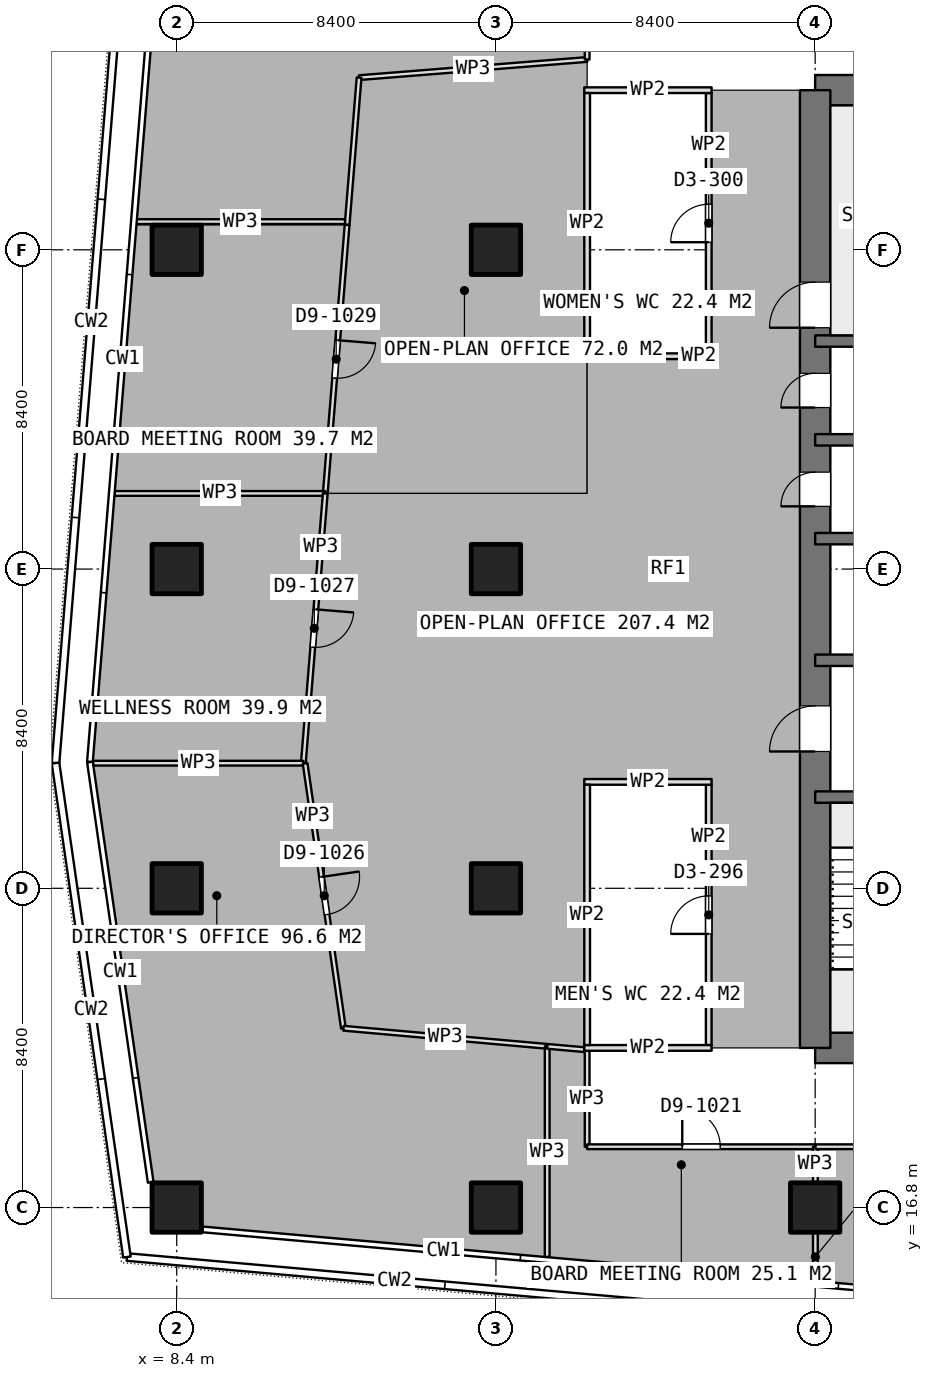
"""IFC4 building model, lengths in metres.
Left out: names, types, materials, properties, quantities, classifications, styles, units other than length and angle.
Written with IfcOpenShell. Run it as: python <this file> out.ifc"""

import sys

from ifc_helpers import new_model, si_unit, direction, frame, frame_2d, origin, origin_2d, place, context, subcontext, project, spatial, rectangle, extrude, element, fill, save


model = new_model("IFC4")
c1 = context("Model", 3, precision=1e-05, world=origin(), true_north=direction((0.0, 1.0)))
c2 = subcontext(c1, "Body", "Model", "MODEL_VIEW")
j1 = project(units=[si_unit("LENGTHUNIT", "METRE"), si_unit("PLANEANGLEUNIT", "RADIAN")], contexts=[c1])
p1 = place(None, origin())
s1 = spatial("IfcSite", under=j1, at=p1, CompositionType="ELEMENT")
p2 = place(p1, origin())
s2 = spatial("IfcBuilding", under=s1, at=p2, CompositionType="ELEMENT")
p3 = place(p2, frame((0.0, 0.0, 276.35)))
s3 = spatial("IfcBuildingStorey", under=s2, at=p3, CompositionType="ELEMENT", Elevation=276.35)
for number, where, z_axis, x_axis in (
    (1, (25.2, 21.0, 0.0), (0.0, 0.0, 1.0), (1.0, 0.0, 0.0)),
    (2, (25.2, 46.2, 0.0), (0.0, 0.0, 1.0), (1.0, 0.0, 0.0)),
):
    element("IfcWall", number, at=place(p3, frame(where, z_axis=z_axis, x_axis=x_axis)), inside=s3, PredefinedType="SHEAR", context=c2, shape_type="SweptSolid", body=[
        extrude(rectangle(XDim=10.4, YDim=0.8, at=frame_2d((5.2, 0.0))), origin(), (0.0, 0.0, 1.0), 3.75),
    ])
p4 = place(p3, frame((25.2, 21.0, 0.0), z_axis=(0.0, 0.0, 1.0), x_axis=(0.0, 1.0, 0.0)))
e3 = element("IfcWall", 3, at=p4, inside=s3, PredefinedType="SHEAR", context=c2, shape_type="SweptSolid", body=[
    extrude(rectangle(XDim=25.2, YDim=0.8, at=frame_2d((12.6, 0.0))), origin(), (0.0, 0.0, 1.0), 3.75),
])
p5 = place(p4, frame((7.8, 0.0, 0.0)))
e4 = element("IfcOpeningElement", 4, at=p5, cuts=e3, PredefinedType="OPENING", context=c2, shape_type="SweptSolid", body=[
    extrude(rectangle(XDim=1.2, YDim=2.1, at=frame_2d((0.6, 1.05))), frame((0.0, 0.41, 0.0), z_axis=(0.0, -1.0, 0.0), x_axis=(1.0, 0.0, 0.0)), (0.0, 0.0, 1.0), 0.82),
])
p6 = place(p4, frame((14.25, 0.0, 0.0)))
e5 = element("IfcOpeningElement", 5, at=p6, cuts=e3, PredefinedType="OPENING", context=c2, shape_type="SweptSolid", body=[
    extrude(rectangle(XDim=0.9, YDim=2.1, at=frame_2d((0.45, 1.05))), frame((0.0, 0.41, 0.0), z_axis=(0.0, -1.0, 0.0), x_axis=(1.0, 0.0, 0.0)), (0.0, 0.0, 1.0), 0.82),
])
p7 = place(p4, frame((16.85, 0.0, 0.0)))
e6 = element("IfcOpeningElement", 6, at=p7, cuts=e3, PredefinedType="OPENING", context=c2, shape_type="SweptSolid", body=[
    extrude(rectangle(XDim=0.9, YDim=2.1, at=frame_2d((0.45, 1.05))), frame((0.0, 0.41, 0.0), z_axis=(0.0, -1.0, 0.0), x_axis=(1.0, 0.0, 0.0)), (0.0, 0.0, 1.0), 0.82),
])
p8 = place(p4, frame((18.95, 0.0, 0.0)))
e7 = element("IfcOpeningElement", 7, at=p8, cuts=e3, PredefinedType="OPENING", context=c2, shape_type="SweptSolid", body=[
    extrude(rectangle(XDim=1.2, YDim=2.1, at=frame_2d((0.6, 1.05))), frame((0.0, 0.41, 0.0), z_axis=(0.0, -1.0, 0.0), x_axis=(1.0, 0.0, 0.0)), (0.0, 0.0, 1.0), 0.82),
])
p9 = place(p3, frame((25.2, 27.6, 0.0), z_axis=(0.0, 0.0, 1.0), x_axis=(1.0, 0.0, 0.0)))
e8 = element("IfcWall", 8, at=p9, inside=s3, PredefinedType="SHEAR", context=c2, shape_type="SweptSolid", body=[
    extrude(rectangle(XDim=6.6, YDim=0.3, at=frame_2d((3.3, 0.0))), origin(), (0.0, 0.0, 1.0), 3.75),
])
p10 = place(p9, frame((5.05, 0.0, 0.0)))
e9 = element("IfcOpeningElement", 9, at=p10, cuts=e8, PredefinedType="OPENING", context=c2, shape_type="SweptSolid", body=[
    extrude(rectangle(XDim=1.2, YDim=2.1, at=frame_2d((0.6, 1.05))), frame((0.0, 0.16, 0.0), z_axis=(0.0, -1.0, 0.0), x_axis=(1.0, 0.0, 0.0)), (0.0, 0.0, 1.0), 0.32),
])
p11 = place(p3, frame((25.2, 31.2, 0.0), z_axis=(0.0, 0.0, 1.0), x_axis=(1.0, 0.0, 0.0)))
e10 = element("IfcWall", 10, at=p11, inside=s3, PredefinedType="SHEAR", context=c2, shape_type="SweptSolid", body=[
    extrude(rectangle(XDim=6.6, YDim=0.3, at=frame_2d((3.3, 0.0))), origin(), (0.0, 0.0, 1.0), 3.75),
])
p12 = place(p11, frame((2.65, 0.0, 0.0)))
e11 = element("IfcOpeningElement", 11, at=p12, cuts=e10, PredefinedType="OPENING", context=c2, shape_type="SweptSolid", body=[
    extrude(rectangle(XDim=1.3, YDim=2.1, at=frame_2d((0.65, 1.05))), frame((0.0, 0.16, 0.0), z_axis=(0.0, -1.0, 0.0), x_axis=(1.0, 0.0, 0.0)), (0.0, 0.0, 1.0), 0.32),
])
for number, where, z_axis, x_axis in (
    (12, (25.2, 34.4, 0.0), (0.0, 0.0, 1.0), (1.0, 0.0, 0.0)),
    (13, (25.2, 37.0, 0.0), (0.0, 0.0, 1.0), (1.0, 0.0, 0.0)),
    (14, (25.2, 39.6, 0.0), (0.0, 0.0, 1.0), (1.0, 0.0, 0.0)),
):
    element("IfcWall", number, at=place(p3, frame(where, z_axis=z_axis, x_axis=x_axis)), inside=s3, PredefinedType="SHEAR", context=c2, shape_type="SweptSolid", body=[
        extrude(rectangle(XDim=6.6, YDim=0.3, at=frame_2d((3.3, 0.0))), origin(), (0.0, 0.0, 1.0), 3.75),
    ])
for number, where, z_axis, x_axis in (
    (15, (8.4, 16.8, 0.0), (0.0, 0.0, 1.0), (1.0, 0.0, 0.0)),
    (16, (8.4, 25.2, 0.0), (0.0, 0.0, 1.0), (1.0, 0.0, 0.0)),
    (17, (8.4, 33.6, 0.0), (0.0, 0.0, 1.0), (1.0, 0.0, 0.0)),
    (18, (8.4, 42.0, 0.0), (0.0, 0.0, 1.0), (1.0, 0.0, 0.0)),
    (19, (16.8, 16.8, 0.0), (0.0, 0.0, 1.0), (1.0, 0.0, 0.0)),
    (20, (16.8, 25.2, 0.0), (0.0, 0.0, 1.0), (1.0, 0.0, 0.0)),
    (21, (16.8, 33.6, 0.0), (0.0, 0.0, 1.0), (1.0, 0.0, 0.0)),
    (22, (16.8, 42.0, 0.0), (0.0, 0.0, 1.0), (1.0, 0.0, 0.0)),
    (23, (25.2, 16.8, 0.0), (0.0, 0.0, 1.0), (1.0, 0.0, 0.0)),
):
    element("IfcColumn", number, at=place(p3, frame(where, z_axis=z_axis, x_axis=x_axis)), inside=s3, PredefinedType="COLUMN", context=c2, shape_type="SweptSolid", body=[
        extrude(rectangle(XDim=1.3, YDim=1.3, at=origin_2d()), origin(), (0.0, 0.0, 1.0), 3.75),
    ])
for number, where, z_axis, x_axis in (
    (24, (19.125, 39.2, 0.0), (0.0, 0.0, 1.0), (1.0, 0.0, 0.0)),
    (25, (19.125, 46.2, 0.0), (0.0, 0.0, 1.0), (1.0, 0.0, 0.0)),
):
    element("IfcWall", number, at=place(p3, frame(where, z_axis=z_axis, x_axis=x_axis)), inside=s3, PredefinedType="PARTITIONING", context=c2, shape_type="SweptSolid", body=[
        extrude(rectangle(XDim=3.35, YDim=0.15, at=frame_2d((1.675, 0.0))), origin(), (0.0, 0.0, 1.0), 3.5),
    ])
p13 = place(p3, frame((19.2, 39.275, 0.0), z_axis=(0.0, 0.0, 1.0), x_axis=(0.0, 1.0, 0.0)))
e26 = element("IfcWall", 26, at=p13, inside=s3, PredefinedType="PARTITIONING", context=c2, shape_type="SweptSolid", body=[
    extrude(rectangle(XDim=6.85, YDim=0.15, at=frame_2d((3.425, 0.0))), origin(), (0.0, 0.0, 1.0), 3.5),
])
p14 = place(p3, frame((22.4, 39.275, 0.0), z_axis=(0.0, 0.0, 1.0), x_axis=(0.0, 1.0, 0.0)))
e27 = element("IfcWall", 27, at=p14, inside=s3, PredefinedType="PARTITIONING", context=c2, shape_type="SweptSolid", body=[
    extrude(rectangle(XDim=6.85, YDim=0.15, at=frame_2d((3.425, 0.0))), origin(), (0.0, 0.0, 1.0), 3.5),
])
p15 = place(p14, frame((2.925, 0.0, 0.0)))
e28 = element("IfcOpeningElement", 28, at=p15, cuts=e27, PredefinedType="OPENING", context=c2, shape_type="SweptSolid", body=[
    extrude(rectangle(XDim=1.0, YDim=2.1, at=frame_2d((0.5, 1.05))), frame((0.0, 0.085, 0.0), z_axis=(0.0, -1.0, 0.0), x_axis=(1.0, 0.0, 0.0)), (0.0, 0.0, 1.0), 0.17),
])
for number, where, z_axis, x_axis in (
    (29, (19.125, 21.0, 0.0), (0.0, 0.0, 1.0), (1.0, 0.0, 0.0)),
    (30, (19.125, 28.0, 0.0), (0.0, 0.0, 1.0), (1.0, 0.0, 0.0)),
):
    element("IfcWall", number, at=place(p3, frame(where, z_axis=z_axis, x_axis=x_axis)), inside=s3, PredefinedType="PARTITIONING", context=c2, shape_type="SweptSolid", body=[
        extrude(rectangle(XDim=3.35, YDim=0.15, at=frame_2d((1.675, 0.0))), origin(), (0.0, 0.0, 1.0), 3.5),
    ])
p16 = place(p3, frame((19.2, 21.075, 0.0), z_axis=(0.0, 0.0, 1.0), x_axis=(0.0, 1.0, 0.0)))
e31 = element("IfcWall", 31, at=p16, inside=s3, PredefinedType="PARTITIONING", context=c2, shape_type="SweptSolid", body=[
    extrude(rectangle(XDim=6.85, YDim=0.15, at=frame_2d((3.425, 0.0))), origin(), (0.0, 0.0, 1.0), 3.5),
])
p17 = place(p3, frame((22.4, 21.075, 0.0), z_axis=(0.0, 0.0, 1.0), x_axis=(0.0, 1.0, 0.0)))
e32 = element("IfcWall", 32, at=p17, inside=s3, PredefinedType="PARTITIONING", context=c2, shape_type="SweptSolid", body=[
    extrude(rectangle(XDim=6.85, YDim=0.15, at=frame_2d((3.425, 0.0))), origin(), (0.0, 0.0, 1.0), 3.5),
])
p18 = place(p17, frame((2.925, 0.0, 0.0)))
e33 = element("IfcOpeningElement", 33, at=p18, cuts=e32, PredefinedType="OPENING", context=c2, shape_type="SweptSolid", body=[
    extrude(rectangle(XDim=1.0, YDim=2.1, at=frame_2d((0.5, 1.05))), frame((0.0, 0.085, 0.0), z_axis=(0.0, -1.0, 0.0), x_axis=(1.0, 0.0, 0.0)), (0.0, 0.0, 1.0), 0.17),
])
p19 = place(p3, frame((19.2, 47.008, 0.0), z_axis=(0.0, 0.0, 1.0), x_axis=(-0.996842300725, -0.079406721921, 0.0)))
e34 = element("IfcWall", 34, at=p19, inside=s3, PredefinedType="PARTITIONING", context=c2, shape_type="SweptSolid", body=[
    extrude(rectangle(XDim=6.02, YDim=0.125, at=frame_2d((3.01, 0.0))), origin(), (0.0, 0.0, 1.0), 3.5),
])
p20 = place(p3, frame((13.199, 46.53, 0.0), z_axis=(0.0, 0.0, 1.0), x_axis=(-0.081048669132, -0.996710145043, 0.0)))
e35 = element("IfcWall", 35, at=p20, inside=s3, PredefinedType="PARTITIONING", context=c2, shape_type="SweptSolid", body=[
    extrude(rectangle(XDim=3.886, YDim=0.125, at=frame_2d((1.943, 0.0))), origin(), (0.0, 0.0, 1.0), 3.5),
])
p21 = place(p3, frame((12.828, 42.742, 0.0), z_axis=(0.0, 0.0, 1.0), x_axis=(-1.0, 0.0, 0.0)))
e36 = element("IfcWall", 36, at=p21, inside=s3, PredefinedType="PARTITIONING", context=c2, shape_type="SweptSolid", body=[
    extrude(rectangle(XDim=5.505, YDim=0.125, at=frame_2d((2.752, 0.0))), origin(), (0.0, 0.0, 1.0), 3.5),
])
p22 = place(p3, frame((19.2, 49.15, 0.0), z_axis=(0.0, 0.0, 1.0), x_axis=(0.0, -1.0, 0.0)))
e37 = element("IfcWall", 37, at=p22, inside=s3, PredefinedType="PARTITIONING", context=c2, shape_type="SweptSolid", body=[
    extrude(rectangle(XDim=2.142, YDim=0.125, at=frame_2d((1.071, 0.0))), origin(), (0.0, 0.0, 1.0), 3.5),
])
p23 = place(p22, frame((0.571, 0.0, 0.0)))
e38 = element("IfcOpeningElement", 38, at=p23, cuts=e37, PredefinedType="OPENING", context=c2, shape_type="SweptSolid", body=[
    extrude(rectangle(XDim=1.0, YDim=2.1, at=frame_2d((0.5, 1.05))), frame((0.0, 0.073, 0.0), z_axis=(0.0, -1.0, 0.0), x_axis=(1.0, 0.0, 0.0)), (0.0, 0.0, 1.0), 0.145),
])
p24 = place(p3, frame((12.884, 42.656, 0.0), z_axis=(0.0, 0.0, 1.0), x_axis=(-0.08110159124, -0.996705840205, 0.0)))
e39 = element("IfcWall", 39, at=p24, inside=s3, PredefinedType="PARTITIONING", context=c2, shape_type="SweptSolid", body=[
    extrude(rectangle(XDim=7.089, YDim=0.125, at=frame_2d((3.545, 0.0))), origin(), (0.0, 0.0, 1.0), 3.5),
])
p25 = place(p24, frame((3.045, 0.0, 0.0)))
e40 = element("IfcOpeningElement", 40, at=p25, cuts=e39, PredefinedType="OPENING", context=c2, shape_type="SweptSolid", body=[
    extrude(rectangle(XDim=1.0, YDim=2.1, at=frame_2d((0.5, 1.05))), frame((0.0, 0.073, 0.0), z_axis=(0.0, -1.0, 0.0), x_axis=(1.0, 0.0, 0.0)), (0.0, 0.0, 1.0), 0.145),
])
p26 = place(p3, frame((12.309, 35.59, 0.0), z_axis=(0.0, 0.0, 1.0), x_axis=(-1.0, 0.0, 0.0)))
e41 = element("IfcWall", 41, at=p26, inside=s3, PredefinedType="PARTITIONING", context=c2, shape_type="SweptSolid", body=[
    extrude(rectangle(XDim=5.538, YDim=0.125, at=frame_2d((2.769, 0.0))), origin(), (0.0, 0.0, 1.0), 3.5),
])
p27 = place(p3, frame((12.309, 35.589, 0.0), z_axis=(0.0, 0.0, 1.0), x_axis=(-0.081053384124, -0.996709761627, 0.0)))
e42 = element("IfcWall", 42, at=p27, inside=s3, PredefinedType="PARTITIONING", context=c2, shape_type="SweptSolid", body=[
    extrude(rectangle(XDim=7.121, YDim=0.125, at=frame_2d((3.56, 0.0))), origin(), (0.0, 0.0, 1.0), 3.5),
])
p28 = place(p27, frame((3.06, 0.0, 0.0)))
e43 = element("IfcOpeningElement", 43, at=p28, cuts=e42, PredefinedType="OPENING", context=c2, shape_type="SweptSolid", body=[
    extrude(rectangle(XDim=1.0, YDim=2.1, at=frame_2d((0.5, 1.05))), frame((0.0, 0.073, 0.0), z_axis=(0.0, -1.0, 0.0), x_axis=(1.0, 0.0, 0.0)), (0.0, 0.0, 1.0), 0.145),
])
p29 = place(p3, frame((11.732, 28.492, 0.0), z_axis=(0.0, 0.0, 1.0), x_axis=(-1.0, 0.0, 0.0)))
e44 = element("IfcWall", 44, at=p29, inside=s3, PredefinedType="PARTITIONING", context=c2, shape_type="SweptSolid", body=[
    extrude(rectangle(XDim=5.531, YDim=0.125, at=frame_2d((2.766, 0.0))), origin(), (0.0, 0.0, 1.0), 3.5),
])
p30 = place(p3, frame((11.779, 28.488, 0.0), z_axis=(0.0, 0.0, 1.0), x_axis=(0.143139230014, -0.989702561799, 0.0)))
e45 = element("IfcWall", 45, at=p30, inside=s3, PredefinedType="PARTITIONING", context=c2, shape_type="SweptSolid", body=[
    extrude(rectangle(XDim=7.042, YDim=0.125, at=frame_2d((3.521, 0.0))), origin(), (0.0, 0.0, 1.0), 3.5),
])
p31 = place(p30, frame((3.02, 0.0, 0.0)))
e46 = element("IfcOpeningElement", 46, at=p31, cuts=e45, PredefinedType="OPENING", context=c2, shape_type="SweptSolid", body=[
    extrude(rectangle(XDim=1.0, YDim=2.1, at=frame_2d((0.5, 1.05))), frame((0.0, 0.073, 0.0), z_axis=(0.0, -1.0, 0.0), x_axis=(1.0, 0.0, 0.0)), (0.0, 0.0, 1.0), 0.145),
])
p32 = place(p3, frame((12.787, 21.518, 0.0), z_axis=(0.0, 0.0, 1.0), x_axis=(0.996065348673, -0.088621787237, 0.0)))
e47 = element("IfcWall", 47, at=p32, inside=s3, PredefinedType="PARTITIONING", context=c2, shape_type="SweptSolid", body=[
    extrude(rectangle(XDim=5.383, YDim=0.125, at=frame_2d((2.691, 0.0))), origin(), (0.0, 0.0, 1.0), 3.5),
])
p33 = place(p3, frame((18.149, 21.041, 0.0), z_axis=(0.0, 0.0, 1.0), x_axis=(0.0, -1.0, 0.0)))
e48 = element("IfcWall", 48, at=p33, inside=s3, PredefinedType="PARTITIONING", context=c2, shape_type="SweptSolid", body=[
    extrude(rectangle(XDim=5.541, YDim=0.125, at=frame_2d((2.771, 0.0))), origin(), (0.0, 0.0, 1.0), 3.5),
])
p34 = place(p3, frame((18.15, 21.041, 0.0), z_axis=(0.0, 0.0, 1.0), x_axis=(0.996138836376, -0.087791905459, 0.0)))
e49 = element("IfcWall", 49, at=p34, inside=s3, PredefinedType="PARTITIONING", context=c2, shape_type="SweptSolid", body=[
    extrude(rectangle(XDim=0.979, YDim=0.125, at=frame_2d((0.489, 0.0))), origin(), (0.0, 0.0, 1.0), 3.5),
])
p35 = place(p3, frame((19.2, 20.925, 0.0), z_axis=(0.0, 0.0, 1.0), x_axis=(0.0, -1.0, 0.0)))
e50 = element("IfcWall", 50, at=p35, inside=s3, PredefinedType="PARTITIONING", context=c2, shape_type="SweptSolid", body=[
    extrude(rectangle(XDim=2.525, YDim=0.125, at=frame_2d((1.263, 0.0))), origin(), (0.0, 0.0, 1.0), 3.5),
])
p36 = place(p3, frame((19.2, 18.4, 0.0), z_axis=(0.0, 0.0, 1.0), x_axis=(1.0, 0.0, 0.0)))
e51 = element("IfcWall", 51, at=p36, inside=s3, PredefinedType="PARTITIONING", context=c2, shape_type="SweptSolid", body=[
    extrude(rectangle(XDim=6.006, YDim=0.125, at=frame_2d((3.003, 0.0))), origin(), (0.0, 0.0, 1.0), 3.5),
])
p37 = place(p36, frame((2.503, 0.0, 0.0)))
e52 = element("IfcOpeningElement", 52, at=p37, cuts=e51, PredefinedType="OPENING", context=c2, shape_type="SweptSolid", body=[
    extrude(rectangle(XDim=1.0, YDim=2.1, at=frame_2d((0.5, 1.05))), frame((0.0, 0.073, 0.0), z_axis=(0.0, -1.0, 0.0), x_axis=(1.0, 0.0, 0.0)), (0.0, 0.0, 1.0), 0.145),
])
p38 = place(p3, frame((25.206, 18.4, 0.0), z_axis=(0.0, 0.0, 1.0), x_axis=(0.0, -1.0, 0.0)))
e53 = element("IfcWall", 53, at=p38, inside=s3, PredefinedType="PARTITIONING", context=c2, shape_type="SweptSolid", body=[
    extrude(rectangle(XDim=0.93, YDim=0.125, at=frame_2d((0.465, 0.0))), origin(), (0.0, 0.0, 1.0), 3.5),
])
p39 = place(p3, frame((25.206, 16.13, 0.0), z_axis=(0.0, 0.0, 1.0), x_axis=(0.0, -1.0, 0.0)))
e54 = element("IfcWall", 54, at=p39, inside=s3, PredefinedType="PARTITIONING", context=c2, shape_type="SweptSolid", body=[
    extrude(rectangle(XDim=1.258, YDim=0.125, at=frame_2d((0.629, 0.0))), origin(), (0.0, 0.0, 1.0), 3.5),
])
p40 = place(p3, frame((25.207, 18.4, 0.0), z_axis=(0.0, 0.0, 1.0), x_axis=(1.0, 0.0, 0.0)))
e55 = element("IfcWall", 55, at=p40, inside=s3, PredefinedType="PARTITIONING", context=c2, shape_type="SweptSolid", body=[
    extrude(rectangle(XDim=10.391, YDim=0.125, at=frame_2d((5.195, 0.0))), origin(), (0.0, 0.0, 1.0), 3.5),
])
p41 = place(p40, frame((4.695, 0.0, 0.0)))
e56 = element("IfcOpeningElement", 56, at=p41, cuts=e55, PredefinedType="OPENING", context=c2, shape_type="SweptSolid", body=[
    extrude(rectangle(XDim=1.0, YDim=2.1, at=frame_2d((0.5, 1.05))), frame((0.0, 0.073, 0.0), z_axis=(0.0, -1.0, 0.0), x_axis=(1.0, 0.0, 0.0)), (0.0, 0.0, 1.0), 0.145),
])
p42 = place(p5, origin())
e57 = element("IfcDoor", 57, at=p42, inside=s3, OperationType="SINGLE_SWING_LEFT", PredefinedType="DOOR", context=c2, shape_type="SweptSolid", body=[
    extrude(rectangle(XDim=1.2, YDim=2.1, at=frame_2d((0.6, 1.05))), frame((0.0, 0.025, 0.0), z_axis=(0.0, -1.0, 0.0), x_axis=(1.0, 0.0, 0.0)), (0.0, 0.0, 1.0), 0.05),
])
fill(e4, e57)
p43 = place(p6, origin())
e58 = element("IfcDoor", 58, at=p43, inside=s3, OperationType="SINGLE_SWING_LEFT", PredefinedType="DOOR", context=c2, shape_type="SweptSolid", body=[
    extrude(rectangle(XDim=0.9, YDim=2.1, at=frame_2d((0.45, 1.05))), frame((0.0, 0.025, 0.0), z_axis=(0.0, -1.0, 0.0), x_axis=(1.0, 0.0, 0.0)), (0.0, 0.0, 1.0), 0.05),
])
fill(e5, e58)
p44 = place(p7, origin())
e59 = element("IfcDoor", 59, at=p44, inside=s3, OperationType="SINGLE_SWING_LEFT", PredefinedType="DOOR", context=c2, shape_type="SweptSolid", body=[
    extrude(rectangle(XDim=0.9, YDim=2.1, at=frame_2d((0.45, 1.05))), frame((0.0, 0.025, 0.0), z_axis=(0.0, -1.0, 0.0), x_axis=(1.0, 0.0, 0.0)), (0.0, 0.0, 1.0), 0.05),
])
fill(e6, e59)
p45 = place(p15, origin())
e60 = element("IfcDoor", 60, at=p45, inside=s3, OperationType="SINGLE_SWING_LEFT", PredefinedType="DOOR", context=c2, shape_type="SweptSolid", body=[
    extrude(rectangle(XDim=1.0, YDim=2.1, at=frame_2d((0.5, 1.05))), frame((0.0, 0.025, 0.0), z_axis=(0.0, -1.0, 0.0), x_axis=(1.0, 0.0, 0.0)), (0.0, 0.0, 1.0), 0.05),
])
fill(e28, e60)
p46 = place(p18, origin())
e61 = element("IfcDoor", 61, at=p46, inside=s3, OperationType="SINGLE_SWING_LEFT", PredefinedType="DOOR", context=c2, shape_type="SweptSolid", body=[
    extrude(rectangle(XDim=1.0, YDim=2.1, at=frame_2d((0.5, 1.05))), frame((0.0, 0.025, 0.0), z_axis=(0.0, -1.0, 0.0), x_axis=(1.0, 0.0, 0.0)), (0.0, 0.0, 1.0), 0.05),
])
fill(e33, e61)
p47 = place(p25, origin())
e62 = element("IfcDoor", 62, at=p47, inside=s3, OperationType="SINGLE_SWING_LEFT", PredefinedType="DOOR", context=c2, shape_type="SweptSolid", body=[
    extrude(rectangle(XDim=1.0, YDim=2.1, at=frame_2d((0.5, 1.05))), frame((0.0, 0.025, 0.0), z_axis=(0.0, -1.0, 0.0), x_axis=(1.0, 0.0, 0.0)), (0.0, 0.0, 1.0), 0.05),
])
fill(e40, e62)
p48 = place(p28, origin())
e63 = element("IfcDoor", 63, at=p48, inside=s3, OperationType="SINGLE_SWING_LEFT", PredefinedType="DOOR", context=c2, shape_type="SweptSolid", body=[
    extrude(rectangle(XDim=1.0, YDim=2.1, at=frame_2d((0.5, 1.05))), frame((0.0, 0.025, 0.0), z_axis=(0.0, -1.0, 0.0), x_axis=(1.0, 0.0, 0.0)), (0.0, 0.0, 1.0), 0.05),
])
fill(e43, e63)
p49 = place(p31, origin())
e64 = element("IfcDoor", 64, at=p49, inside=s3, OperationType="SINGLE_SWING_LEFT", PredefinedType="DOOR", context=c2, shape_type="SweptSolid", body=[
    extrude(rectangle(XDim=1.0, YDim=2.1, at=frame_2d((0.5, 1.05))), frame((0.0, 0.025, 0.0), z_axis=(0.0, -1.0, 0.0), x_axis=(1.0, 0.0, 0.0)), (0.0, 0.0, 1.0), 0.05),
])
fill(e46, e64)
p50 = place(p37, origin())
e65 = element("IfcDoor", 65, at=p50, inside=s3, OperationType="SINGLE_SWING_LEFT", PredefinedType="DOOR", context=c2, shape_type="SweptSolid", body=[
    extrude(rectangle(XDim=1.0, YDim=2.1, at=frame_2d((0.5, 1.05))), frame((0.0, 0.025, 0.0), z_axis=(0.0, -1.0, 0.0), x_axis=(1.0, 0.0, 0.0)), (0.0, 0.0, 1.0), 0.05),
])
fill(e52, e65)
p51 = place(p8, origin())
e66 = element("IfcDoor", 66, at=p51, inside=s3, OperationType="SINGLE_SWING_RIGHT", PredefinedType="DOOR", context=c2, shape_type="SweptSolid", body=[
    extrude(rectangle(XDim=1.2, YDim=2.1, at=frame_2d((0.6, 1.05))), frame((0.0, 0.025, 0.0), z_axis=(0.0, -1.0, 0.0), x_axis=(1.0, 0.0, 0.0)), (0.0, 0.0, 1.0), 0.05),
])
fill(e7, e66)
save(model, sys.argv[1])
